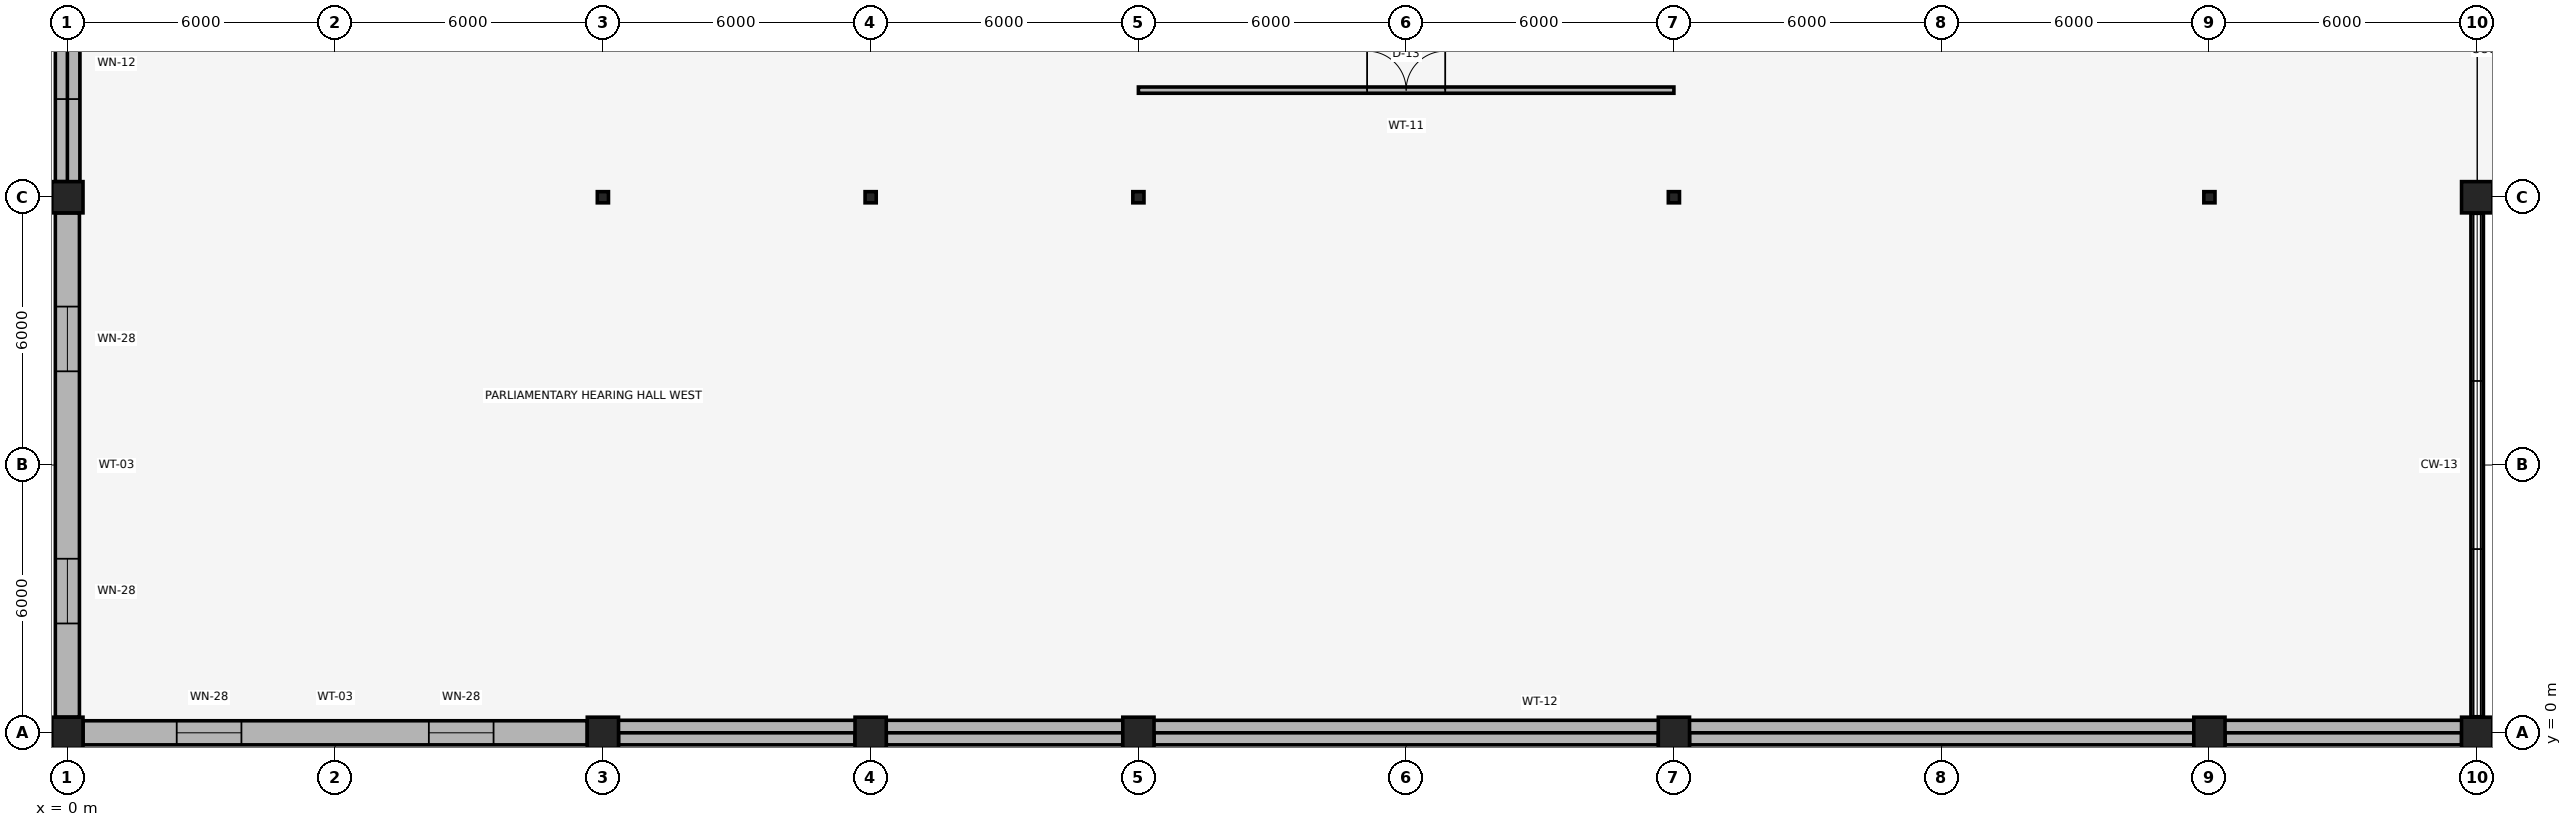
"""IFC4 building model, lengths in metres.
Left out: names, types, materials, properties, quantities, classifications, styles, units other than length and angle.
Written with IfcOpenShell. Run it as: python <this file> out.ifc"""

import sys

from ifc_helpers import new_model, si_unit, direction, frame, frame_2d, origin, origin_2d, place, context, subcontext, project, spatial, rectangle, i_section, extrude, element, fill, save


model = new_model("IFC4")
c1 = context("Model", 3, precision=1e-05, world=origin(), true_north=direction((0.0, 1.0)))
c2 = subcontext(c1, "Body", "Model", "MODEL_VIEW")
j1 = project(units=[si_unit("LENGTHUNIT", "METRE"), si_unit("PLANEANGLEUNIT", "RADIAN")], contexts=[c1])
p1 = place(None, origin())
s1 = spatial("IfcSite", under=j1, at=p1, CompositionType="ELEMENT")
p2 = place(p1, origin())
s2 = spatial("IfcBuilding", under=s1, at=p2, CompositionType="ELEMENT")
p3 = place(p2, frame((0.0, 0.0, 16.5)))
s3 = spatial("IfcBuildingStorey", under=s2, at=p3, CompositionType="ELEMENT", Elevation=16.5)
for number, where, z_axis, x_axis in (
    (1, (0.0, 0.0, 0.0), (0.0, 0.0, 1.0), (1.0, 0.0, 0.0)),
    (2, (12.0, 0.0, 0.0), (0.0, 0.0, 1.0), (1.0, 0.0, 0.0)),
    (3, (18.0, 0.0, 0.0), (0.0, 0.0, 1.0), (1.0, 0.0, 0.0)),
    (4, (24.0, 0.0, 0.0), (0.0, 0.0, 1.0), (1.0, 0.0, 0.0)),
    (5, (36.0, 0.0, 0.0), (0.0, 0.0, 1.0), (1.0, 0.0, 0.0)),
    (6, (48.0, 0.0, 0.0), (0.0, 0.0, 1.0), (1.0, 0.0, 0.0)),
    (7, (54.0, 0.0, 0.0), (0.0, 0.0, 1.0), (1.0, 0.0, 0.0)),
    (8, (0.0, 12.0, 0.0), (0.0, 0.0, 1.0), (1.0, 0.0, 0.0)),
):
    element("IfcColumn", number, at=place(p3, frame(where, z_axis=z_axis, x_axis=x_axis)), inside=s3, PredefinedType="COLUMN", context=c2, shape_type="SweptSolid", body=[
        extrude(rectangle(XDim=0.7, YDim=0.7, at=origin_2d()), origin(), (0.0, 0.0, 1.0), 4.0),
    ])
for number, where, z_axis, x_axis in (
    (9, (12.0, 12.0, 0.0), (0.0, 0.0, 1.0), (1.0, 0.0, 0.0)),
    (10, (18.0, 12.0, 0.0), (0.0, 0.0, 1.0), (1.0, 0.0, 0.0)),
    (11, (24.0, 12.0, 0.0), (0.0, 0.0, 1.0), (1.0, 0.0, 0.0)),
    (12, (36.0, 12.0, 0.0), (0.0, 0.0, 1.0), (1.0, 0.0, 0.0)),
    (13, (48.0, 12.0, 0.0), (0.0, 0.0, 1.0), (1.0, 0.0, 0.0)),
):
    element("IfcColumn", number, at=place(p3, frame(where, z_axis=z_axis, x_axis=x_axis)), inside=s3, PredefinedType="COLUMN", context=c2, shape_type="SweptSolid", body=[
        extrude(i_section(OverallWidth=0.25, OverallDepth=0.25, WebThickness=0.009, FlangeThickness=0.014, FilletRadius=0.016, at=origin_2d()), origin(), (0.0, 0.0, 1.0), 4.0),
    ])
p4 = place(p3, frame((54.0, 12.0, 0.0), z_axis=(0.0, 0.0, 1.0), x_axis=(1.0, 0.0, 0.0)))
e14 = element("IfcColumn", 14, at=p4, inside=s3, PredefinedType="COLUMN", context=c2, shape_type="SweptSolid", body=[
    extrude(rectangle(XDim=0.7, YDim=0.7, at=origin_2d()), origin(), (0.0, 0.0, 1.0), 4.0),
])
p5 = place(p3, frame((0.35, 0.0, 0.0), z_axis=(0.0, 0.0, 1.0), x_axis=(1.0, 0.0, 0.0)))
e15 = element("IfcWall", 15, at=p5, inside=s3, PredefinedType="SOLIDWALL", context=c2, shape_type="SweptSolid", body=[
    extrude(rectangle(XDim=11.3, YDim=0.54, at=frame_2d((5.65, 0.0))), origin(), (0.0, 0.0, 1.0), 3.55),
])
p6 = place(p5, frame((2.1, 0.0, 0.85)))
e16 = element("IfcOpeningElement", 16, at=p6, cuts=e15, PredefinedType="OPENING", context=c2, shape_type="SweptSolid", body=[
    extrude(rectangle(XDim=1.45, YDim=2.15, at=frame_2d((0.725, 1.075))), frame((0.0, 0.285, 0.0), z_axis=(0.0, -1.0, 0.0), x_axis=(1.0, 0.0, 0.0)), (0.0, 0.0, 1.0), 0.57),
])
p7 = place(p5, frame((7.75, 0.0, 0.85)))
e17 = element("IfcOpeningElement", 17, at=p7, cuts=e15, PredefinedType="OPENING", context=c2, shape_type="SweptSolid", body=[
    extrude(rectangle(XDim=1.45, YDim=2.15, at=frame_2d((0.725, 1.075))), frame((0.0, 0.285, 0.0), z_axis=(0.0, -1.0, 0.0), x_axis=(1.0, 0.0, 0.0)), (0.0, 0.0, 1.0), 0.57),
])
for number, where, z_axis, x_axis in (
    (18, (12.35, 0.0, 0.0), (0.0, 0.0, 1.0), (1.0, 0.0, 0.0)),
    (19, (18.35, 0.0, 0.0), (0.0, 0.0, 1.0), (1.0, 0.0, 0.0)),
):
    element("IfcWall", number, at=place(p3, frame(where, z_axis=z_axis, x_axis=x_axis)), inside=s3, PredefinedType="SOLIDWALL", context=c2, shape_type="SweptSolid", body=[
        extrude(rectangle(XDim=5.3, YDim=0.54, at=frame_2d((2.65, 0.0))), origin(), (0.0, 0.0, 1.0), 3.55),
    ])
for number, where, z_axis, x_axis in (
    (20, (24.35, 0.0, 0.0), (0.0, 0.0, 1.0), (1.0, 0.0, 0.0)),
    (21, (36.35, 0.0, 0.0), (0.0, 0.0, 1.0), (1.0, 0.0, 0.0)),
):
    element("IfcWall", number, at=place(p3, frame(where, z_axis=z_axis, x_axis=x_axis)), inside=s3, PredefinedType="SOLIDWALL", context=c2, shape_type="SweptSolid", body=[
        extrude(rectangle(XDim=11.3, YDim=0.54, at=frame_2d((5.65, 0.0))), origin(), (0.0, 0.0, 1.0), 3.55),
    ])
p8 = place(p3, frame((48.35, 0.0, 0.0), z_axis=(0.0, 0.0, 1.0), x_axis=(1.0, 0.0, 0.0)))
e22 = element("IfcWall", 22, at=p8, inside=s3, PredefinedType="SOLIDWALL", context=c2, shape_type="SweptSolid", body=[
    extrude(rectangle(XDim=5.3, YDim=0.54, at=frame_2d((2.65, 0.0))), origin(), (0.0, 0.0, 1.0), 3.55),
])
p9 = place(p3, frame((0.0, 0.35, 0.0), z_axis=(0.0, 0.0, 1.0), x_axis=(0.0, 1.0, 0.0)))
e23 = element("IfcWall", 23, at=p9, inside=s3, PredefinedType="SOLIDWALL", context=c2, shape_type="SweptSolid", body=[
    extrude(rectangle(XDim=11.3, YDim=0.54, at=frame_2d((5.65, 0.0))), origin(), (0.0, 0.0, 1.0), 3.55),
])
p10 = place(p9, frame((2.1, 0.0, 0.85)))
e24 = element("IfcOpeningElement", 24, at=p10, cuts=e23, PredefinedType="OPENING", context=c2, shape_type="SweptSolid", body=[
    extrude(rectangle(XDim=1.45, YDim=2.15, at=frame_2d((0.725, 1.075))), frame((0.0, 0.285, 0.0), z_axis=(0.0, -1.0, 0.0), x_axis=(1.0, 0.0, 0.0)), (0.0, 0.0, 1.0), 0.57),
])
p11 = place(p9, frame((7.75, 0.0, 0.85)))
e25 = element("IfcOpeningElement", 25, at=p11, cuts=e23, PredefinedType="OPENING", context=c2, shape_type="SweptSolid", body=[
    extrude(rectangle(XDim=1.45, YDim=2.15, at=frame_2d((0.725, 1.075))), frame((0.0, 0.285, 0.0), z_axis=(0.0, -1.0, 0.0), x_axis=(1.0, 0.0, 0.0)), (0.0, 0.0, 1.0), 0.57),
])
p12 = place(p3, frame((0.0, 12.35, 0.0), z_axis=(0.0, 0.0, 1.0), x_axis=(0.0, 1.0, 0.0)))
e26 = element("IfcWall", 26, at=p12, inside=s3, PredefinedType="SOLIDWALL", context=c2, shape_type="SweptSolid", body=[
    extrude(rectangle(XDim=5.3, YDim=0.54, at=frame_2d((2.65, 0.0))), origin(), (0.0, 0.0, 1.0), 3.55),
])
p13 = place(p12, frame((1.85, 0.0, 0.85)))
e27 = element("IfcOpeningElement", 27, at=p13, cuts=e26, PredefinedType="OPENING", context=c2, shape_type="SweptSolid", body=[
    extrude(rectangle(XDim=1.6, YDim=2.2, at=frame_2d((0.8, 1.1))), frame((0.0, 0.285, 0.0), z_axis=(0.0, -1.0, 0.0), x_axis=(1.0, 0.0, 0.0)), (0.0, 0.0, 1.0), 0.57),
])
p14 = place(p3, frame((12.0, 0.14, 4.2), z_axis=(0.0, 0.0, 1.0), x_axis=(1.0, 0.0, 0.0)))
e28 = element("IfcWall", 28, at=p14, inside=s3, PredefinedType="PARAPET", context=c2, shape_type="SweptSolid", body=[
    extrude(rectangle(XDim=42.0, YDim=0.28, at=frame_2d((21.0, 0.0))), origin(), (0.0, 0.0, 1.0), 0.85),
])
p15 = place(p3, frame((54.0, 0.0, 4.2), z_axis=(0.0, 0.0, 1.0), x_axis=(0.0, 1.0, 0.0)))
e29 = element("IfcWall", 29, at=p15, inside=s3, PredefinedType="PARAPET", context=c2, shape_type="SweptSolid", body=[
    extrude(rectangle(XDim=12.28, YDim=0.28, at=frame_2d((6.14, 0.0))), origin(), (0.0, 0.0, 1.0), 0.85),
])
p16 = place(p3, frame((54.0, 12.14, 4.2), z_axis=(0.0, 0.0, 1.0), x_axis=(1.0, 0.0, 0.0)))
e30 = element("IfcWall", 30, at=p16, inside=s3, PredefinedType="PARAPET", context=c2, shape_type="SweptSolid", body=[
    extrude(rectangle(XDim=60.0, YDim=0.28, at=frame_2d((30.0, 0.0))), origin(), (0.0, 0.0, 1.0), 0.85),
])
p17 = place(p3, frame((0.14, 12.0, 4.2), z_axis=(0.0, 0.0, 1.0), x_axis=(0.0, 1.0, 0.0)))
e31 = element("IfcWall", 31, at=p17, inside=s3, PredefinedType="PARAPET", context=c2, shape_type="SweptSolid", body=[
    extrude(rectangle(XDim=90.0, YDim=0.28, at=frame_2d((45.0, 0.0))), origin(), (0.0, 0.0, 1.0), 0.85),
])
p18 = place(p3, frame((24.0, 14.4, 0.0), z_axis=(0.0, 0.0, 1.0), x_axis=(1.0, 0.0, 0.0)))
e32 = element("IfcWall", 32, at=p18, inside=s3, PredefinedType="PARTITIONING", context=c2, shape_type="SweptSolid", body=[
    extrude(rectangle(XDim=12.0, YDim=0.14, at=frame_2d((6.0, 0.0))), origin(), (0.0, 0.0, 1.0), 4.0),
])
p19 = place(p18, frame((5.125, 0.0, 0.0)))
e33 = element("IfcOpeningElement", 33, at=p19, cuts=e32, PredefinedType="OPENING", context=c2, shape_type="SweptSolid", body=[
    extrude(rectangle(XDim=1.75, YDim=2.55, at=frame_2d((0.875, 1.275))), frame((0.0, 0.085, 0.0), z_axis=(0.0, -1.0, 0.0), x_axis=(1.0, 0.0, 0.0)), (0.0, 0.0, 1.0), 0.17),
])
p20 = place(p6, origin())
e34 = element("IfcWindow", 34, at=p20, inside=s3, PartitioningType="SINGLE_PANEL", PredefinedType="WINDOW", context=c2, shape_type="SweptSolid", body=[
    extrude(rectangle(XDim=1.45, YDim=2.15, at=frame_2d((0.725, 1.075))), frame((0.0, 0.03, 0.0), z_axis=(0.0, -1.0, 0.0), x_axis=(1.0, 0.0, 0.0)), (0.0, 0.0, 1.0), 0.06),
])
fill(e16, e34)
p21 = place(p7, origin())
e35 = element("IfcWindow", 35, at=p21, inside=s3, PartitioningType="SINGLE_PANEL", PredefinedType="WINDOW", context=c2, shape_type="SweptSolid", body=[
    extrude(rectangle(XDim=1.45, YDim=2.15, at=frame_2d((0.725, 1.075))), frame((0.0, 0.03, 0.0), z_axis=(0.0, -1.0, 0.0), x_axis=(1.0, 0.0, 0.0)), (0.0, 0.0, 1.0), 0.06),
])
fill(e17, e35)
p22 = place(p10, origin())
e36 = element("IfcWindow", 36, at=p22, inside=s3, PartitioningType="SINGLE_PANEL", PredefinedType="WINDOW", context=c2, shape_type="SweptSolid", body=[
    extrude(rectangle(XDim=1.45, YDim=2.15, at=frame_2d((0.725, 1.075))), frame((0.0, 0.03, 0.0), z_axis=(0.0, -1.0, 0.0), x_axis=(1.0, 0.0, 0.0)), (0.0, 0.0, 1.0), 0.06),
])
fill(e24, e36)
p23 = place(p11, origin())
e37 = element("IfcWindow", 37, at=p23, inside=s3, PartitioningType="SINGLE_PANEL", PredefinedType="WINDOW", context=c2, shape_type="SweptSolid", body=[
    extrude(rectangle(XDim=1.45, YDim=2.15, at=frame_2d((0.725, 1.075))), frame((0.0, 0.03, 0.0), z_axis=(0.0, -1.0, 0.0), x_axis=(1.0, 0.0, 0.0)), (0.0, 0.0, 1.0), 0.06),
])
fill(e25, e37)
p24 = place(p13, origin())
e38 = element("IfcWindow", 38, at=p24, inside=s3, PartitioningType="SINGLE_PANEL", PredefinedType="WINDOW", context=c2, shape_type="SweptSolid", body=[
    extrude(rectangle(XDim=1.6, YDim=2.2, at=frame_2d((0.8, 1.1))), frame((0.0, 0.03, 0.0), z_axis=(0.0, -1.0, 0.0), x_axis=(1.0, 0.0, 0.0)), (0.0, 0.0, 1.0), 0.06),
])
fill(e27, e38)
p25 = place(p19, origin())
e39 = element("IfcDoor", 39, at=p25, inside=s3, OperationType="DOUBLE_DOOR_SINGLE_SWING", PredefinedType="DOOR", context=c2, shape_type="SweptSolid", body=[
    extrude(rectangle(XDim=1.75, YDim=2.55, at=frame_2d((0.875, 1.275))), frame((0.0, 0.025, 0.0), z_axis=(0.0, -1.0, 0.0), x_axis=(1.0, 0.0, 0.0)), (0.0, 0.0, 1.0), 0.05),
])
fill(e33, e39)
save(model, sys.argv[1])
